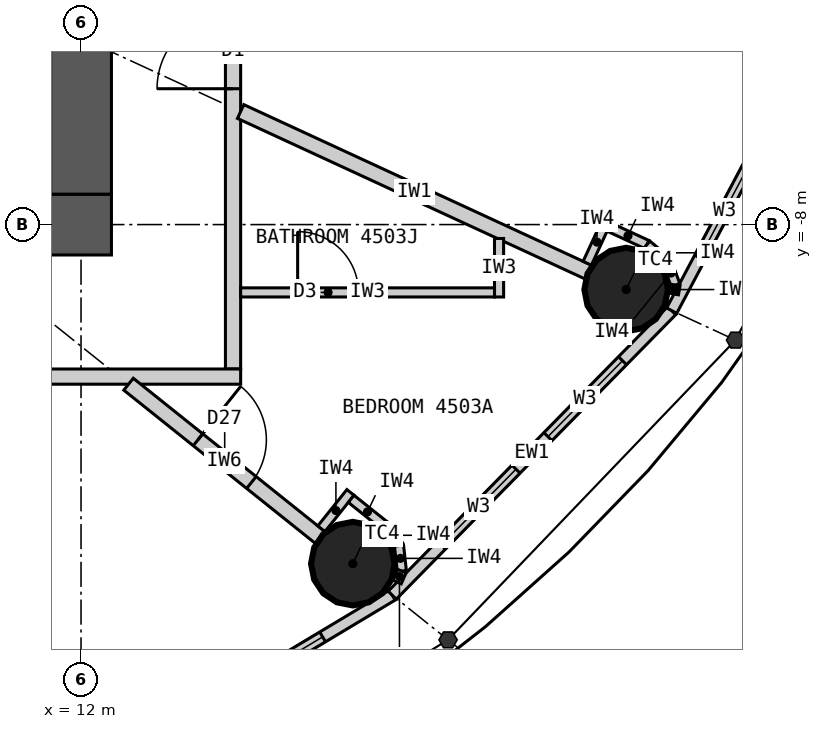
"""IFC4 building model, lengths in metres.
Left out: names, types, materials, properties, quantities, classifications, styles, units other than length and angle.
Written with IfcOpenShell. Run it as: python <this file> out.ifc"""

import sys

from ifc_helpers import new_model, si_unit, direction, frame, frame_2d, origin, origin_2d, place, context, subcontext, project, spatial, rectangle, circle, extrude, element, fill, save


model = new_model("IFC4")
c1 = context("Model", 3, precision=1e-05, world=origin(), true_north=direction((0.0, 1.0)))
c2 = subcontext(c1, "Body", "Model", "MODEL_VIEW")
j1 = project(units=[si_unit("LENGTHUNIT", "METRE"), si_unit("PLANEANGLEUNIT", "RADIAN")], contexts=[c1])
p1 = place(None, origin())
s1 = spatial("IfcSite", under=j1, at=p1, CompositionType="ELEMENT")
p2 = place(p1, origin())
s2 = spatial("IfcBuilding", under=s1, at=p2, CompositionType="ELEMENT")
p3 = place(p2, frame((0.0, 0.0, 169.8)))
s3 = spatial("IfcBuildingStorey", under=s2, at=p3, CompositionType="ELEMENT", Elevation=169.8)
for number, where, z_axis, x_axis in (
    (1, (15.576, -12.461, 0.0), (0.0, 0.0, 1.0), (1.0, 0.0, 0.0)),
    (2, (19.172, -8.855, 0.0), (0.0, 0.0, 1.0), (1.0, 0.0, 0.0)),
):
    element("IfcColumn", number, at=place(p3, frame(where, z_axis=z_axis, x_axis=x_axis)), inside=s3, PredefinedType="COLUMN", context=c2, shape_type="SweptSolid", body=[
        extrude(circle(Radius=0.55, at=origin_2d()), origin(), (0.0, 0.0, 1.0), 3.3),
    ])
p4 = place(p3, frame((12.4, -8.0, 0.0), z_axis=(0.0, 0.0, 1.0), x_axis=(-1.0, 0.0, 0.0)))
e3 = element("IfcWall", 3, at=p4, inside=s3, PredefinedType="SHEAR", context=c2, shape_type="SweptSolid", body=[
    extrude(rectangle(XDim=24.8, YDim=0.8, at=frame_2d((12.4, 0.0))), origin(), (0.0, 0.0, 1.0), 3.3),
])
p5 = place(p4, frame((11.1, 0.0, 0.0)))
e4 = element("IfcOpeningElement", 4, at=p5, cuts=e3, PredefinedType="OPENING", context=c2, shape_type="SweptSolid", body=[
    extrude(rectangle(XDim=1.2, YDim=2.2, at=frame_2d((0.6, 1.1))), frame((0.0, 0.41, 0.0), z_axis=(0.0, -1.0, 0.0), x_axis=(1.0, 0.0, 0.0)), (0.0, 0.0, 1.0), 0.82),
])
p6 = place(p4, frame((18.7, 0.0, 0.0)))
e5 = element("IfcOpeningElement", 5, at=p6, cuts=e3, PredefinedType="OPENING", context=c2, shape_type="SweptSolid", body=[
    extrude(rectangle(XDim=0.9, YDim=2.2, at=frame_2d((0.45, 1.1))), frame((0.0, 0.41, 0.0), z_axis=(0.0, -1.0, 0.0), x_axis=(1.0, 0.0, 0.0)), (0.0, 0.0, 1.0), 0.82),
])
p7 = place(p3, frame((12.0, -7.6, 0.0), z_axis=(0.0, 0.0, 1.0), x_axis=(0.0, 1.0, 0.0)))
e6 = element("IfcWall", 6, at=p7, inside=s3, PredefinedType="SHEAR", context=c2, shape_type="SweptSolid", body=[
    extrude(rectangle(XDim=15.2, YDim=0.8, at=frame_2d((7.6, 0.0))), origin(), (0.0, 0.0, 1.0), 3.3),
])
p8 = place(p7, frame((6.7, 0.0, 0.0)))
e7 = element("IfcOpeningElement", 7, at=p8, cuts=e6, PredefinedType="OPENING", context=c2, shape_type="SweptSolid", body=[
    extrude(rectangle(XDim=1.8, YDim=2.2, at=frame_2d((0.9, 1.1))), frame((0.0, 0.41, 0.0), z_axis=(0.0, -1.0, 0.0), x_axis=(1.0, 0.0, 0.0)), (0.0, 0.0, 1.0), 0.82),
])
p9 = place(p3, frame((11.346, -15.722, 0.0), z_axis=(0.0, 0.0, 1.0), x_axis=(0.857695199231, 0.514158482587, 0.0)))
e8 = element("IfcWall", 8, at=p9, inside=s3, PredefinedType="ELEMENTEDWALL", context=c2, shape_type="SweptSolid", body=[
    extrude(rectangle(XDim=5.536, YDim=0.15, at=frame_2d((2.768, 0.0))), origin(), (0.0, 0.0, 1.0), 3.12),
])
p10 = place(p9, frame((1.068, 0.0, 0.9)))
e9 = element("IfcOpeningElement", 9, at=p10, cuts=e8, PredefinedType="OPENING", context=c2, shape_type="SweptSolid", body=[
    extrude(rectangle(XDim=1.4, YDim=1.9, at=frame_2d((0.7, 0.95))), frame((0.0, 0.085, 0.0), z_axis=(0.0, -1.0, 0.0), x_axis=(1.0, 0.0, 0.0)), (0.0, 0.0, 1.0), 0.17),
])
p11 = place(p9, frame((3.068, 0.0, 0.9)))
e10 = element("IfcOpeningElement", 10, at=p11, cuts=e8, PredefinedType="OPENING", context=c2, shape_type="SweptSolid", body=[
    extrude(rectangle(XDim=1.4, YDim=1.9, at=frame_2d((0.7, 0.95))), frame((0.0, 0.085, 0.0), z_axis=(0.0, -1.0, 0.0), x_axis=(1.0, 0.0, 0.0)), (0.0, 0.0, 1.0), 0.17),
])
p12 = place(p3, frame((16.095, -12.876, 0.0), z_axis=(0.0, 0.0, 1.0), x_axis=(0.700727467776, 0.71342905457, 0.0)))
e11 = element("IfcWall", 11, at=p12, inside=s3, PredefinedType="ELEMENTEDWALL", context=c2, shape_type="SweptSolid", body=[
    extrude(rectangle(XDim=5.247, YDim=0.15, at=frame_2d((2.624, 0.0))), origin(), (0.0, 0.0, 1.0), 3.12),
])
p13 = place(p12, frame((0.924, 0.0, 0.9)))
e12 = element("IfcOpeningElement", 12, at=p13, cuts=e11, PredefinedType="OPENING", context=c2, shape_type="SweptSolid", body=[
    extrude(rectangle(XDim=1.4, YDim=1.9, at=frame_2d((0.7, 0.95))), frame((0.0, 0.085, 0.0), z_axis=(0.0, -1.0, 0.0), x_axis=(1.0, 0.0, 0.0)), (0.0, 0.0, 1.0), 0.17),
])
p14 = place(p12, frame((2.924, 0.0, 0.9)))
e13 = element("IfcOpeningElement", 13, at=p14, cuts=e11, PredefinedType="OPENING", context=c2, shape_type="SweptSolid", body=[
    extrude(rectangle(XDim=1.4, YDim=1.9, at=frame_2d((0.7, 0.95))), frame((0.0, 0.085, 0.0), z_axis=(0.0, -1.0, 0.0), x_axis=(1.0, 0.0, 0.0)), (0.0, 0.0, 1.0), 0.17),
])
p15 = place(p3, frame((19.772, -9.132, 0.0), z_axis=(0.0, 0.0, 1.0), x_axis=(0.468428906714, 0.883501193748, 0.0)))
e14 = element("IfcWall", 14, at=p15, inside=s3, PredefinedType="ELEMENTEDWALL", context=c2, shape_type="SweptSolid", body=[
    extrude(rectangle(XDim=4.974, YDim=0.15, at=frame_2d((2.487, 0.0))), origin(), (0.0, 0.0, 1.0), 3.12),
])
p16 = place(p15, frame((0.787, 0.0, 0.9)))
e15 = element("IfcOpeningElement", 15, at=p16, cuts=e14, PredefinedType="OPENING", context=c2, shape_type="SweptSolid", body=[
    extrude(rectangle(XDim=1.4, YDim=1.9, at=frame_2d((0.7, 0.95))), frame((0.0, 0.085, 0.0), z_axis=(0.0, -1.0, 0.0), x_axis=(1.0, 0.0, 0.0)), (0.0, 0.0, 1.0), 0.17),
])
p17 = place(p15, frame((2.787, 0.0, 0.9)))
e16 = element("IfcOpeningElement", 16, at=p17, cuts=e14, PredefinedType="OPENING", context=c2, shape_type="SweptSolid", body=[
    extrude(rectangle(XDim=1.4, YDim=1.9, at=frame_2d((0.7, 0.95))), frame((0.0, 0.085, 0.0), z_axis=(0.0, -1.0, 0.0), x_axis=(1.0, 0.0, 0.0)), (0.0, 0.0, 1.0), 0.17),
])
p18 = place(p3, frame((14.0, -9.9, 0.0), z_axis=(0.0, 0.0, 1.0), x_axis=(0.0, 1.0, 0.0)))
e17 = element("IfcWall", 17, at=p18, inside=s3, PredefinedType="PARTITIONING", context=c2, shape_type="SweptSolid", body=[
    extrude(rectangle(XDim=19.8, YDim=0.2, at=frame_2d((9.9, 0.0))), origin(), (0.0, 0.0, 1.0), 3.12),
])
p19 = place(p18, frame((3.688, 0.0, 0.0)))
e18 = element("IfcOpeningElement", 18, at=p19, cuts=e17, PredefinedType="OPENING", context=c2, shape_type="SweptSolid", body=[
    extrude(rectangle(XDim=1.0, YDim=2.2, at=frame_2d((0.5, 1.1))), frame((0.0, 0.11, 0.0), z_axis=(0.0, -1.0, 0.0), x_axis=(1.0, 0.0, 0.0)), (0.0, 0.0, 1.0), 0.22),
])
p20 = place(p18, frame((9.979, 0.0, 0.0)))
e19 = element("IfcOpeningElement", 19, at=p20, cuts=e17, PredefinedType="OPENING", context=c2, shape_type="SweptSolid", body=[
    extrude(rectangle(XDim=1.0, YDim=2.2, at=frame_2d((0.5, 1.1))), frame((0.0, 0.11, 0.0), z_axis=(0.0, -1.0, 0.0), x_axis=(1.0, 0.0, 0.0)), (0.0, 0.0, 1.0), 0.22),
])
p21 = place(p18, frame((17.122, 0.0, 0.0)))
e20 = element("IfcOpeningElement", 20, at=p21, cuts=e17, PredefinedType="OPENING", context=c2, shape_type="SweptSolid", body=[
    extrude(rectangle(XDim=1.0, YDim=2.2, at=frame_2d((0.5, 1.1))), frame((0.0, 0.11, 0.0), z_axis=(0.0, -1.0, 0.0), x_axis=(1.0, 0.0, 0.0)), (0.0, 0.0, 1.0), 0.22),
])
p22 = place(p3, frame((14.1, -10.0, 0.0), z_axis=(0.0, 0.0, 1.0), x_axis=(-1.0, 0.0, 0.0)))
e21 = element("IfcWall", 21, at=p22, inside=s3, PredefinedType="PARTITIONING", context=c2, shape_type="SweptSolid", body=[
    extrude(rectangle(XDim=28.2, YDim=0.2, at=frame_2d((14.1, 0.0))), origin(), (0.0, 0.0, 1.0), 3.12),
])
p23 = place(p22, frame((23.165, 0.0, 0.0)))
e22 = element("IfcOpeningElement", 22, at=p23, cuts=e21, PredefinedType="OPENING", context=c2, shape_type="SweptSolid", body=[
    extrude(rectangle(XDim=1.0, YDim=2.2, at=frame_2d((0.5, 1.1))), frame((0.0, 0.11, 0.0), z_axis=(0.0, -1.0, 0.0), x_axis=(1.0, 0.0, 0.0)), (0.0, 0.0, 1.0), 0.22),
])
p24 = place(p22, frame((13.923, 0.0, 0.0)))
e23 = element("IfcOpeningElement", 23, at=p24, cuts=e21, PredefinedType="OPENING", context=c2, shape_type="SweptSolid", body=[
    extrude(rectangle(XDim=1.0, YDim=2.2, at=frame_2d((0.5, 1.1))), frame((0.0, 0.11, 0.0), z_axis=(0.0, -1.0, 0.0), x_axis=(1.0, 0.0, 0.0)), (0.0, 0.0, 1.0), 0.22),
])
p25 = place(p22, frame((7.957, 0.0, 0.0)))
e24 = element("IfcOpeningElement", 24, at=p25, cuts=e21, PredefinedType="OPENING", context=c2, shape_type="SweptSolid", body=[
    extrude(rectangle(XDim=1.0, YDim=2.2, at=frame_2d((0.5, 1.1))), frame((0.0, 0.11, 0.0), z_axis=(0.0, -1.0, 0.0), x_axis=(1.0, 0.0, 0.0)), (0.0, 0.0, 1.0), 0.22),
])
p26 = place(p3, frame((12.625, -10.1, 0.0), z_axis=(0.0, 0.0, 1.0), x_axis=(0.780876185034, -0.624685827954, 0.0)))
e25 = element("IfcWall", 25, at=p26, inside=s3, PredefinedType="PARTITIONING", context=c2, shape_type="SweptSolid", body=[
    extrude(rectangle(XDim=3.229, YDim=0.2, at=frame_2d((1.615, 0.0))), origin(), (0.0, 0.0, 1.0), 2.42),
])
p27 = place(p26, frame((1.17, 0.0, 0.0)))
e26 = element("IfcOpeningElement", 26, at=p27, cuts=e25, PredefinedType="OPENING", context=c2, shape_type="SweptSolid", body=[
    extrude(rectangle(XDim=0.9, YDim=2.1, at=frame_2d((0.45, 1.05))), frame((0.0, 0.11, 0.0), z_axis=(0.0, -1.0, 0.0), x_axis=(1.0, 0.0, 0.0)), (0.0, 0.0, 1.0), 0.22),
])
p28 = place(p3, frame((14.1, -6.512, 0.0), z_axis=(0.0, 0.0, 1.0), x_axis=(0.907823150669, -0.419353224751, 0.0)))
e27 = element("IfcWall", 27, at=p28, inside=s3, PredefinedType="PARTITIONING", context=c2, shape_type="SweptSolid", body=[
    extrude(rectangle(XDim=5.037, YDim=0.2, at=frame_2d((2.519, 0.0))), origin(), (0.0, 0.0, 1.0), 2.32),
])
p29 = place(p3, frame((17.5, -8.183, 0.0), z_axis=(0.0, 0.0, 1.0), x_axis=(0.0, -1.0, 0.0)))
e28 = element("IfcWall", 28, at=p29, inside=s3, PredefinedType="PARTITIONING", context=c2, shape_type="SweptSolid", body=[
    extrude(rectangle(XDim=0.77, YDim=0.12, at=frame_2d((0.385, 0.0))), origin(), (0.0, 0.0, 1.0), 3.12),
])
p30 = place(p3, frame((14.1, -8.893, 0.0), z_axis=(0.0, 0.0, 1.0), x_axis=(1.0, 0.0, 0.0)))
e29 = element("IfcWall", 29, at=p30, inside=s3, PredefinedType="PARTITIONING", context=c2, shape_type="SweptSolid", body=[
    extrude(rectangle(XDim=3.34, YDim=0.12, at=frame_2d((1.67, 0.0))), origin(), (0.0, 0.0, 1.0), 3.12),
])
p31 = place(p30, frame((0.75, 0.0, 0.0)))
e30 = element("IfcOpeningElement", 30, at=p31, cuts=e29, PredefinedType="OPENING", context=c2, shape_type="SweptSolid", body=[
    extrude(rectangle(XDim=0.8, YDim=2.1, at=frame_2d((0.4, 1.05))), frame((0.0, 0.07, 0.0), z_axis=(0.0, -1.0, 0.0), x_axis=(1.0, 0.0, 0.0)), (0.0, 0.0, 1.0), 0.14),
])
p32 = place(p3, frame((15.162, -12.002, 0.0), z_axis=(0.0, 0.0, 1.0), x_axis=(0.624597762427, 0.780946627607, 0.0)))
e31 = element("IfcWall", 31, at=p32, inside=s3, PredefinedType="PARTITIONING", context=c2, shape_type="SweptSolid", body=[
    extrude(rectangle(XDim=0.612, YDim=0.12, at=frame_2d((0.306, 0.0))), origin(), (0.0, 0.0, 1.0), 3.12),
])
p33 = place(p3, frame((15.554, -11.608, 0.0), z_axis=(0.0, 0.0, 1.0), x_axis=(0.780695577787, -0.624911525597, 0.0)))
e32 = element("IfcWall", 32, at=p33, inside=s3, PredefinedType="PARTITIONING", context=c2, shape_type="SweptSolid", body=[
    extrude(rectangle(XDim=0.55, YDim=0.12, at=frame_2d((0.275, 0.0))), origin(), (0.0, 0.0, 1.0), 3.12),
])
p34 = place(p3, frame((15.984, -11.952, 0.0), z_axis=(0.0, 0.0, 1.0), x_axis=(0.592335221171, -0.805691619517, 0.0)))
e33 = element("IfcWall", 33, at=p34, inside=s3, PredefinedType="PARTITIONING", context=c2, shape_type="SweptSolid", body=[
    extrude(rectangle(XDim=0.338, YDim=0.12, at=frame_2d((0.169, 0.0))), origin(), (0.0, 0.0, 1.0), 3.12),
])
p35 = place(p3, frame((16.184, -12.224, 0.0), z_axis=(0.0, 0.0, 1.0), x_axis=(0.110669692975, -0.993857242795, 0.0)))
e34 = element("IfcWall", 34, at=p35, inside=s3, PredefinedType="PARTITIONING", context=c2, shape_type="SweptSolid", body=[
    extrude(rectangle(XDim=0.337, YDim=0.12, at=frame_2d((0.169, 0.0))), origin(), (0.0, 0.0, 1.0), 3.12),
])
p36 = place(p3, frame((16.221, -12.559, 0.0), z_axis=(0.0, 0.0, 1.0), x_axis=(-0.401064416249, -0.916049853457, 0.0)))
e35 = element("IfcWall", 35, at=p36, inside=s3, PredefinedType="PARTITIONING", context=c2, shape_type="SweptSolid", body=[
    extrude(rectangle(XDim=0.156, YDim=0.12, at=frame_2d((0.078, 0.0))), origin(), (0.0, 0.0, 1.0), 3.12),
])
p37 = place(p3, frame((18.66, -8.509, 0.0), z_axis=(0.0, 0.0, 1.0), x_axis=(0.419083463716, 0.907947713494, 0.0)))
e36 = element("IfcWall", 36, at=p37, inside=s3, PredefinedType="PARTITIONING", context=c2, shape_type="SweptSolid", body=[
    extrude(rectangle(XDim=0.612, YDim=0.12, at=frame_2d((0.306, 0.0))), origin(), (0.0, 0.0, 1.0), 3.12),
])
p38 = place(p3, frame((18.946, -8.032, 0.0), z_axis=(0.0, 0.0, 1.0), x_axis=(0.907842467956, -0.419311403822, 0.0)))
e37 = element("IfcWall", 37, at=p38, inside=s3, PredefinedType="PARTITIONING", context=c2, shape_type="SweptSolid", body=[
    extrude(rectangle(XDim=0.55, YDim=0.12, at=frame_2d((0.275, 0.0))), origin(), (0.0, 0.0, 1.0), 3.12),
])
p39 = place(p3, frame((19.446, -8.263, 0.0), z_axis=(0.0, 0.0, 1.0), x_axis=(0.768221279597, -0.640184399664, 0.0)))
e38 = element("IfcWall", 38, at=p39, inside=s3, PredefinedType="PARTITIONING", context=c2, shape_type="SweptSolid", body=[
    extrude(rectangle(XDim=0.337, YDim=0.12, at=frame_2d((0.169, 0.0))), origin(), (0.0, 0.0, 1.0), 3.12),
])
p40 = place(p3, frame((19.705, -8.479, 0.0), z_axis=(0.0, 0.0, 1.0), x_axis=(0.345571344575, -0.938392479621, 0.0)))
e39 = element("IfcWall", 39, at=p40, inside=s3, PredefinedType="PARTITIONING", context=c2, shape_type="SweptSolid", body=[
    extrude(rectangle(XDim=0.338, YDim=0.12, at=frame_2d((0.169, 0.0))), origin(), (0.0, 0.0, 1.0), 3.12),
])
p41 = place(p3, frame((19.822, -8.796, 0.0), z_axis=(0.0, 0.0, 1.0), x_axis=(-0.169701508781, -0.985495508827, 0.0)))
e40 = element("IfcWall", 40, at=p41, inside=s3, PredefinedType="PARTITIONING", context=c2, shape_type="SweptSolid", body=[
    extrude(rectangle(XDim=0.119, YDim=0.12, at=frame_2d((0.06, 0.0))), origin(), (0.0, 0.0, 1.0), 3.12),
])
p42 = place(p11, origin())
e41 = element("IfcWindow", 41, at=p42, inside=s3, PartitioningType="SINGLE_PANEL", PredefinedType="WINDOW", context=c2, shape_type="SweptSolid", body=[
    extrude(rectangle(XDim=1.4, YDim=1.9, at=frame_2d((0.7, 0.95))), frame((0.0, 0.03, 0.0), z_axis=(0.0, -1.0, 0.0), x_axis=(1.0, 0.0, 0.0)), (0.0, 0.0, 1.0), 0.06),
])
fill(e10, e41)
p43 = place(p13, origin())
e42 = element("IfcWindow", 42, at=p43, inside=s3, PartitioningType="SINGLE_PANEL", PredefinedType="WINDOW", context=c2, shape_type="SweptSolid", body=[
    extrude(rectangle(XDim=1.4, YDim=1.9, at=frame_2d((0.7, 0.95))), frame((0.0, 0.03, 0.0), z_axis=(0.0, -1.0, 0.0), x_axis=(1.0, 0.0, 0.0)), (0.0, 0.0, 1.0), 0.06),
])
fill(e12, e42)
p44 = place(p14, origin())
e43 = element("IfcWindow", 43, at=p44, inside=s3, PartitioningType="SINGLE_PANEL", PredefinedType="WINDOW", context=c2, shape_type="SweptSolid", body=[
    extrude(rectangle(XDim=1.4, YDim=1.9, at=frame_2d((0.7, 0.95))), frame((0.0, 0.03, 0.0), z_axis=(0.0, -1.0, 0.0), x_axis=(1.0, 0.0, 0.0)), (0.0, 0.0, 1.0), 0.06),
])
fill(e13, e43)
p45 = place(p16, origin())
e44 = element("IfcWindow", 44, at=p45, inside=s3, PartitioningType="SINGLE_PANEL", PredefinedType="WINDOW", context=c2, shape_type="SweptSolid", body=[
    extrude(rectangle(XDim=1.4, YDim=1.9, at=frame_2d((0.7, 0.95))), frame((0.0, 0.03, 0.0), z_axis=(0.0, -1.0, 0.0), x_axis=(1.0, 0.0, 0.0)), (0.0, 0.0, 1.0), 0.06),
])
fill(e15, e44)
p46 = place(p31, origin())
e45 = element("IfcDoor", 45, at=p46, inside=s3, OperationType="SINGLE_SWING_LEFT", PredefinedType="DOOR", context=c2, shape_type="SweptSolid", body=[
    extrude(rectangle(XDim=0.8, YDim=2.1, at=frame_2d((0.4, 1.05))), frame((0.0, 0.025, 0.0), z_axis=(0.0, -1.0, 0.0), x_axis=(1.0, 0.0, 0.0)), (0.0, 0.0, 1.0), 0.05),
])
fill(e30, e45)
p47 = place(p27, origin())
e46 = element("IfcDoor", 46, at=p47, inside=s3, OperationType="SINGLE_SWING_LEFT", PredefinedType="DOOR", context=c2, shape_type="SweptSolid", body=[
    extrude(rectangle(XDim=0.9, YDim=2.1, at=frame_2d((0.45, 1.05))), frame((0.0, 0.025, 0.0), z_axis=(0.0, -1.0, 0.0), x_axis=(1.0, 0.0, 0.0)), (0.0, 0.0, 1.0), 0.05),
])
fill(e26, e46)
p48 = place(p19, origin())
e47 = element("IfcDoor", 47, at=p48, inside=s3, OperationType="SINGLE_SWING_LEFT", PredefinedType="DOOR", context=c2, shape_type="SweptSolid", body=[
    extrude(rectangle(XDim=1.0, YDim=2.2, at=frame_2d((0.5, 1.1))), frame((0.0, 0.025, 0.0), z_axis=(0.0, -1.0, 0.0), x_axis=(1.0, 0.0, 0.0)), (0.0, 0.0, 1.0), 0.05),
])
fill(e18, e47)
save(model, sys.argv[1])
